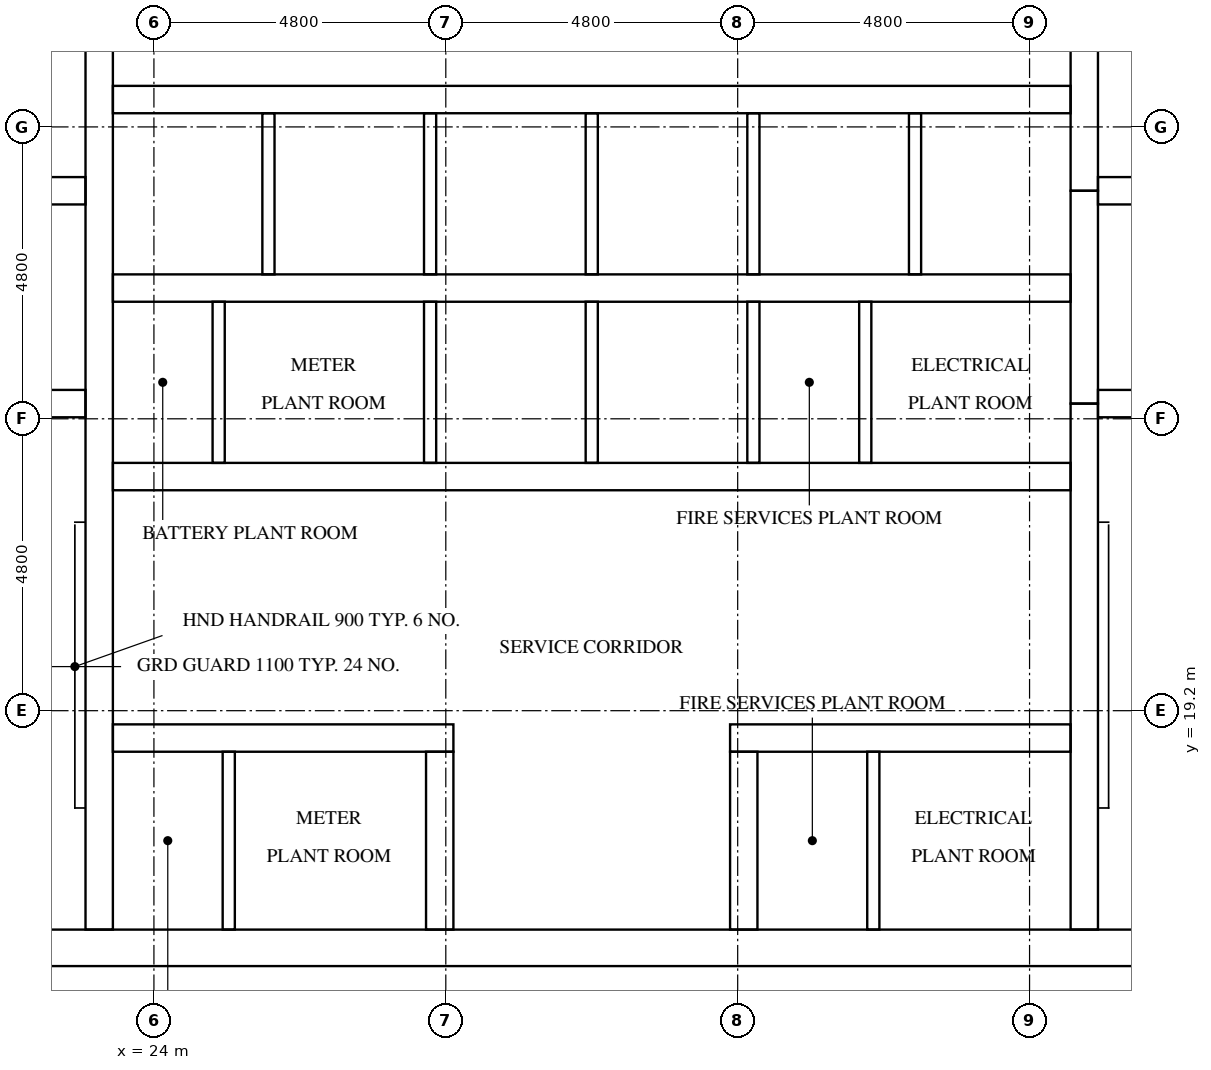
"""IFC4 building model, lengths in metres.
Left out: names, types, materials, properties, quantities, classifications, styles, units other than length and angle.
Written with IfcOpenShell. Run it as: python <this file> out.ifc"""

import sys

from ifc_helpers import new_model, si_unit, direction, frame, frame_2d, origin, place, context, subcontext, project, spatial, rectangle, extrude, element, fill, save


model = new_model("IFC4")
c1 = context("Model", 3, precision=1e-05, world=origin(), true_north=direction((0.0, 1.0)))
c2 = subcontext(c1, "Body", "Model", "MODEL_VIEW")
j1 = project(units=[si_unit("LENGTHUNIT", "METRE"), si_unit("PLANEANGLEUNIT", "RADIAN")], contexts=[c1])
p1 = place(None, origin())
s1 = spatial("IfcSite", under=j1, at=p1, CompositionType="ELEMENT")
p2 = place(p1, origin())
s2 = spatial("IfcBuilding", under=s1, at=p2, CompositionType="ELEMENT")
p3 = place(p2, frame((0.0, 0.0, 233.3)))
s3 = spatial("IfcBuildingStorey", under=s2, at=p3, CompositionType="ELEMENT", Elevation=233.3)
p4 = place(p3, frame((15.0, 15.3, 0.0), z_axis=(0.0, 0.0, 1.0), x_axis=(1.0, 0.0, 0.0)))
e1 = element("IfcWall", 1, at=p4, inside=s3, PredefinedType="SHEAR", context=c2, shape_type="SweptSolid", body=[
    extrude(rectangle(XDim=32.4, YDim=0.6, at=frame_2d((16.2, 0.0))), origin(), (0.0, 0.0, 1.0), 5.1),
])
p5 = place(p4, frame((15.3, 0.0, 0.0)))
e2 = element("IfcOpeningElement", 2, at=p5, cuts=e1, PredefinedType="OPENING", context=c2, shape_type="SweptSolid", body=[
    extrude(rectangle(XDim=1.8, YDim=2.1, at=frame_2d((0.9, 1.05))), frame((0.0, 0.31, 0.0), z_axis=(0.0, -1.0, 0.0), x_axis=(1.0, 0.0, 0.0)), (0.0, 0.0, 1.0), 0.62),
])
p6 = place(p3, frame((23.1, 15.6, 0.0), z_axis=(0.0, 0.0, 1.0), x_axis=(0.0, 1.0, 0.0)))
e3 = element("IfcWall", 3, at=p6, inside=s3, PredefinedType="SHEAR", context=c2, shape_type="SweptSolid", body=[
    extrude(rectangle(XDim=21.6, YDim=0.45, at=frame_2d((10.8, 0.0))), origin(), (0.0, 0.0, 1.0), 5.1),
])
p7 = place(p3, frame((39.3, 15.6, 0.0), z_axis=(0.0, 0.0, 1.0), x_axis=(0.0, 1.0, 0.0)))
e4 = element("IfcWall", 4, at=p7, inside=s3, PredefinedType="SHEAR", context=c2, shape_type="SweptSolid", body=[
    extrude(rectangle(XDim=8.65, YDim=0.45, at=frame_2d((4.325, 0.0))), origin(), (0.0, 0.0, 1.0), 5.1),
])
p8 = place(p3, frame((39.3, 24.25, 0.0), z_axis=(0.0, 0.0, 1.0), x_axis=(0.0, 1.0, 0.0)))
e5 = element("IfcWall", 5, at=p8, inside=s3, PredefinedType="SHEAR", context=c2, shape_type="SweptSolid", body=[
    extrude(rectangle(XDim=3.5, YDim=0.45, at=frame_2d((1.75, 0.0))), origin(), (0.0, 0.0, 1.0), 5.1),
])
p9 = place(p3, frame((39.3, 27.75, 0.0), z_axis=(0.0, 0.0, 1.0), x_axis=(0.0, 1.0, 0.0)))
e6 = element("IfcWall", 6, at=p9, inside=s3, PredefinedType="SHEAR", context=c2, shape_type="SweptSolid", body=[
    extrude(rectangle(XDim=9.45, YDim=0.45, at=frame_2d((4.725, 0.0))), origin(), (0.0, 0.0, 1.0), 5.1),
])
for number, where, z_axis, x_axis in (
    (7, (19.275, 24.25, 0.0), (0.0, 0.0, 1.0), (1.0, 0.0, 0.0)),
    (8, (19.275, 27.75, 0.0), (0.0, 0.0, 1.0), (1.0, 0.0, 0.0)),
    (9, (39.525, 24.25, 0.0), (0.0, 0.0, 1.0), (1.0, 0.0, 0.0)),
    (10, (39.525, 27.75, 0.0), (0.0, 0.0, 1.0), (1.0, 0.0, 0.0)),
):
    element("IfcWall", number, at=place(p3, frame(where, z_axis=z_axis, x_axis=x_axis)), inside=s3, PredefinedType="SHEAR", context=c2, shape_type="SweptSolid", body=[
        extrude(rectangle(XDim=3.6, YDim=0.45, at=frame_2d((1.8, 0.0))), origin(), (0.0, 0.0, 1.0), 5.1),
    ])
p10 = place(p3, frame((23.325, 18.75, 0.0), z_axis=(0.0, 0.0, 1.0), x_axis=(1.0, 0.0, 0.0)))
e11 = element("IfcWall", 11, at=p10, inside=s3, PredefinedType="SHEAR", context=c2, shape_type="SweptSolid", body=[
    extrude(rectangle(XDim=5.6, YDim=0.45, at=frame_2d((2.8, 0.0))), origin(), (0.0, 0.0, 1.0), 5.1),
])
p11 = place(p10, frame((0.403, 0.0, 0.0)))
e12 = element("IfcOpeningElement", 12, at=p11, cuts=e11, PredefinedType="OPENING", context=c2, shape_type="SweptSolid", body=[
    extrude(rectangle(XDim=1.0, YDim=2.1, at=frame_2d((0.5, 1.05))), frame((0.0, 0.235, 0.0), z_axis=(0.0, -1.0, 0.0), x_axis=(1.0, 0.0, 0.0)), (0.0, 0.0, 1.0), 0.47),
])
p12 = place(p10, frame((3.078, 0.0, 0.0)))
e13 = element("IfcOpeningElement", 13, at=p12, cuts=e11, PredefinedType="OPENING", context=c2, shape_type="SweptSolid", body=[
    extrude(rectangle(XDim=1.0, YDim=2.1, at=frame_2d((0.5, 1.05))), frame((0.0, 0.235, 0.0), z_axis=(0.0, -1.0, 0.0), x_axis=(1.0, 0.0, 0.0)), (0.0, 0.0, 1.0), 0.47),
])
p13 = place(p3, frame((33.475, 18.75, 0.0), z_axis=(0.0, 0.0, 1.0), x_axis=(1.0, 0.0, 0.0)))
e14 = element("IfcWall", 14, at=p13, inside=s3, PredefinedType="SHEAR", context=c2, shape_type="SweptSolid", body=[
    extrude(rectangle(XDim=5.6, YDim=0.45, at=frame_2d((2.8, 0.0))), origin(), (0.0, 0.0, 1.0), 5.1),
])
p14 = place(p13, frame((0.853, 0.0, 0.0)))
e15 = element("IfcOpeningElement", 15, at=p14, cuts=e14, PredefinedType="OPENING", context=c2, shape_type="SweptSolid", body=[
    extrude(rectangle(XDim=1.0, YDim=2.1, at=frame_2d((0.5, 1.05))), frame((0.0, 0.235, 0.0), z_axis=(0.0, -1.0, 0.0), x_axis=(1.0, 0.0, 0.0)), (0.0, 0.0, 1.0), 0.47),
])
p15 = place(p13, frame((3.528, 0.0, 0.0)))
e16 = element("IfcOpeningElement", 16, at=p15, cuts=e14, PredefinedType="OPENING", context=c2, shape_type="SweptSolid", body=[
    extrude(rectangle(XDim=1.0, YDim=2.1, at=frame_2d((0.5, 1.05))), frame((0.0, 0.235, 0.0), z_axis=(0.0, -1.0, 0.0), x_axis=(1.0, 0.0, 0.0)), (0.0, 0.0, 1.0), 0.47),
])
p16 = place(p3, frame((23.325, 23.05, 0.0), z_axis=(0.0, 0.0, 1.0), x_axis=(1.0, 0.0, 0.0)))
e17 = element("IfcWall", 17, at=p16, inside=s3, PredefinedType="SHEAR", context=c2, shape_type="SweptSolid", body=[
    extrude(rectangle(XDim=15.75, YDim=0.45, at=frame_2d((7.875, 0.0))), origin(), (0.0, 0.0, 1.0), 5.1),
])
p17 = place(p16, frame((0.32, 0.0, 0.0)))
e18 = element("IfcOpeningElement", 18, at=p17, cuts=e17, PredefinedType="OPENING", context=c2, shape_type="SweptSolid", body=[
    extrude(rectangle(XDim=1.0, YDim=2.1, at=frame_2d((0.5, 1.05))), frame((0.0, 0.235, 0.0), z_axis=(0.0, -1.0, 0.0), x_axis=(1.0, 0.0, 0.0)), (0.0, 0.0, 1.0), 0.47),
])
p18 = place(p16, frame((2.978, 0.0, 0.0)))
e19 = element("IfcOpeningElement", 19, at=p18, cuts=e17, PredefinedType="OPENING", context=c2, shape_type="SweptSolid", body=[
    extrude(rectangle(XDim=1.0, YDim=2.1, at=frame_2d((0.5, 1.05))), frame((0.0, 0.235, 0.0), z_axis=(0.0, -1.0, 0.0), x_axis=(1.0, 0.0, 0.0)), (0.0, 0.0, 1.0), 0.47),
])
p19 = place(p16, frame((10.953, 0.0, 0.0)))
e20 = element("IfcOpeningElement", 20, at=p19, cuts=e17, PredefinedType="OPENING", context=c2, shape_type="SweptSolid", body=[
    extrude(rectangle(XDim=1.0, YDim=2.1, at=frame_2d((0.5, 1.05))), frame((0.0, 0.235, 0.0), z_axis=(0.0, -1.0, 0.0), x_axis=(1.0, 0.0, 0.0)), (0.0, 0.0, 1.0), 0.47),
])
p20 = place(p16, frame((13.612, 0.0, 0.0)))
e21 = element("IfcOpeningElement", 21, at=p20, cuts=e17, PredefinedType="OPENING", context=c2, shape_type="SweptSolid", body=[
    extrude(rectangle(XDim=1.0, YDim=2.1, at=frame_2d((0.5, 1.05))), frame((0.0, 0.235, 0.0), z_axis=(0.0, -1.0, 0.0), x_axis=(1.0, 0.0, 0.0)), (0.0, 0.0, 1.0), 0.47),
])
p21 = place(p3, frame((23.325, 26.15, 0.0), z_axis=(0.0, 0.0, 1.0), x_axis=(1.0, 0.0, 0.0)))
e22 = element("IfcWall", 22, at=p21, inside=s3, PredefinedType="SHEAR", context=c2, shape_type="SweptSolid", body=[
    extrude(rectangle(XDim=15.75, YDim=0.45, at=frame_2d((7.875, 0.0))), origin(), (0.0, 0.0, 1.0), 5.1),
])
p22 = place(p3, frame((23.325, 29.25, 0.0), z_axis=(0.0, 0.0, 1.0), x_axis=(1.0, 0.0, 0.0)))
e23 = element("IfcWall", 23, at=p22, inside=s3, PredefinedType="SHEAR", context=c2, shape_type="SweptSolid", body=[
    extrude(rectangle(XDim=15.75, YDim=0.45, at=frame_2d((7.875, 0.0))), origin(), (0.0, 0.0, 1.0), 5.1),
])
p23 = place(p22, frame((0.679, 0.0, 0.0)))
e24 = element("IfcOpeningElement", 24, at=p23, cuts=e23, PredefinedType="OPENING", context=c2, shape_type="SweptSolid", body=[
    extrude(rectangle(XDim=1.1, YDim=2.1, at=frame_2d((0.55, 1.05))), frame((0.0, 0.235, 0.0), z_axis=(0.0, -1.0, 0.0), x_axis=(1.0, 0.0, 0.0)), (0.0, 0.0, 1.0), 0.47),
])
p24 = place(p22, frame((3.337, 0.0, 0.0)))
e25 = element("IfcOpeningElement", 25, at=p24, cuts=e23, PredefinedType="OPENING", context=c2, shape_type="SweptSolid", body=[
    extrude(rectangle(XDim=1.1, YDim=2.1, at=frame_2d((0.55, 1.05))), frame((0.0, 0.235, 0.0), z_axis=(0.0, -1.0, 0.0), x_axis=(1.0, 0.0, 0.0)), (0.0, 0.0, 1.0), 0.47),
])
p25 = place(p22, frame((5.996, 0.0, 0.0)))
e26 = element("IfcOpeningElement", 26, at=p25, cuts=e23, PredefinedType="OPENING", context=c2, shape_type="SweptSolid", body=[
    extrude(rectangle(XDim=1.1, YDim=2.1, at=frame_2d((0.55, 1.05))), frame((0.0, 0.235, 0.0), z_axis=(0.0, -1.0, 0.0), x_axis=(1.0, 0.0, 0.0)), (0.0, 0.0, 1.0), 0.47),
])
p26 = place(p22, frame((8.654, 0.0, 0.0)))
e27 = element("IfcOpeningElement", 27, at=p26, cuts=e23, PredefinedType="OPENING", context=c2, shape_type="SweptSolid", body=[
    extrude(rectangle(XDim=1.1, YDim=2.1, at=frame_2d((0.55, 1.05))), frame((0.0, 0.235, 0.0), z_axis=(0.0, -1.0, 0.0), x_axis=(1.0, 0.0, 0.0)), (0.0, 0.0, 1.0), 0.47),
])
p27 = place(p22, frame((11.312, 0.0, 0.0)))
e28 = element("IfcOpeningElement", 28, at=p27, cuts=e23, PredefinedType="OPENING", context=c2, shape_type="SweptSolid", body=[
    extrude(rectangle(XDim=1.1, YDim=2.1, at=frame_2d((0.55, 1.05))), frame((0.0, 0.235, 0.0), z_axis=(0.0, -1.0, 0.0), x_axis=(1.0, 0.0, 0.0)), (0.0, 0.0, 1.0), 0.47),
])
p28 = place(p22, frame((13.971, 0.0, 0.0)))
e29 = element("IfcOpeningElement", 29, at=p28, cuts=e23, PredefinedType="OPENING", context=c2, shape_type="SweptSolid", body=[
    extrude(rectangle(XDim=1.1, YDim=2.1, at=frame_2d((0.55, 1.05))), frame((0.0, 0.235, 0.0), z_axis=(0.0, -1.0, 0.0), x_axis=(1.0, 0.0, 0.0)), (0.0, 0.0, 1.0), 0.47),
])
for number, where, z_axis, x_axis in (
    (30, (28.7, 15.6, 0.0), (0.0, 0.0, 1.0), (0.0, 1.0, 0.0)),
    (31, (33.7, 15.6, 0.0), (0.0, 0.0, 1.0), (0.0, 1.0, 0.0)),
):
    element("IfcWall", number, at=place(p3, frame(where, z_axis=z_axis, x_axis=x_axis)), inside=s3, PredefinedType="SHEAR", context=c2, shape_type="SweptSolid", body=[
        extrude(rectangle(XDim=2.925, YDim=0.45, at=frame_2d((1.462, 0.0))), origin(), (0.0, 0.0, 1.0), 5.1),
    ])
p29 = place(p3, frame((25.883, 26.375, 0.0), z_axis=(0.0, 0.0, 1.0), x_axis=(0.0, 1.0, 0.0)))
e32 = element("IfcWall", 32, at=p29, inside=s3, PredefinedType="SOLIDWALL", context=c2, shape_type="SweptSolid", body=[
    extrude(rectangle(XDim=2.65, YDim=0.2, at=frame_2d((1.325, 0.0))), origin(), (0.0, 0.0, 1.0), 5.1),
])
p30 = place(p3, frame((28.542, 23.275, 0.0), z_axis=(0.0, 0.0, 1.0), x_axis=(0.0, 1.0, 0.0)))
e33 = element("IfcWall", 33, at=p30, inside=s3, PredefinedType="SOLIDWALL", context=c2, shape_type="SweptSolid", body=[
    extrude(rectangle(XDim=2.65, YDim=0.2, at=frame_2d((1.325, 0.0))), origin(), (0.0, 0.0, 1.0), 5.1),
])
p31 = place(p3, frame((28.542, 26.375, 0.0), z_axis=(0.0, 0.0, 1.0), x_axis=(0.0, 1.0, 0.0)))
e34 = element("IfcWall", 34, at=p31, inside=s3, PredefinedType="SOLIDWALL", context=c2, shape_type="SweptSolid", body=[
    extrude(rectangle(XDim=2.65, YDim=0.2, at=frame_2d((1.325, 0.0))), origin(), (0.0, 0.0, 1.0), 5.1),
])
p32 = place(p3, frame((31.2, 23.275, 0.0), z_axis=(0.0, 0.0, 1.0), x_axis=(0.0, 1.0, 0.0)))
e35 = element("IfcWall", 35, at=p32, inside=s3, PredefinedType="SOLIDWALL", context=c2, shape_type="SweptSolid", body=[
    extrude(rectangle(XDim=2.65, YDim=0.2, at=frame_2d((1.325, 0.0))), origin(), (0.0, 0.0, 1.0), 5.1),
])
p33 = place(p3, frame((31.2, 26.375, 0.0), z_axis=(0.0, 0.0, 1.0), x_axis=(0.0, 1.0, 0.0)))
e36 = element("IfcWall", 36, at=p33, inside=s3, PredefinedType="SOLIDWALL", context=c2, shape_type="SweptSolid", body=[
    extrude(rectangle(XDim=2.65, YDim=0.2, at=frame_2d((1.325, 0.0))), origin(), (0.0, 0.0, 1.0), 5.1),
])
p34 = place(p3, frame((33.858, 23.275, 0.0), z_axis=(0.0, 0.0, 1.0), x_axis=(0.0, 1.0, 0.0)))
e37 = element("IfcWall", 37, at=p34, inside=s3, PredefinedType="SOLIDWALL", context=c2, shape_type="SweptSolid", body=[
    extrude(rectangle(XDim=2.65, YDim=0.2, at=frame_2d((1.325, 0.0))), origin(), (0.0, 0.0, 1.0), 5.1),
])
for number, where, z_axis, x_axis in (
    (38, (33.858, 26.375, 0.0), (0.0, 0.0, 1.0), (0.0, 1.0, 0.0)),
    (39, (36.517, 26.375, 0.0), (0.0, 0.0, 1.0), (0.0, 1.0, 0.0)),
):
    element("IfcWall", number, at=place(p3, frame(where, z_axis=z_axis, x_axis=x_axis)), inside=s3, PredefinedType="SOLIDWALL", context=c2, shape_type="SweptSolid", body=[
        extrude(rectangle(XDim=2.65, YDim=0.2, at=frame_2d((1.325, 0.0))), origin(), (0.0, 0.0, 1.0), 5.1),
    ])
for number, where, z_axis, x_axis in (
    (40, (25.065, 23.275, 0.0), (0.0, 0.0, 1.0), (0.0, 1.0, 0.0)),
    (41, (35.698, 23.275, 0.0), (0.0, 0.0, 1.0), (0.0, 1.0, 0.0)),
):
    element("IfcWall", number, at=place(p3, frame(where, z_axis=z_axis, x_axis=x_axis)), inside=s3, PredefinedType="PARTITIONING", context=c2, shape_type="SweptSolid", body=[
        extrude(rectangle(XDim=2.65, YDim=0.2, at=frame_2d((1.325, 0.0))), origin(), (0.0, 0.0, 1.0), 5.1),
    ])
for number, where, z_axis, x_axis in (
    (42, (25.23, 15.6, 0.0), (0.0, 0.0, 1.0), (0.0, 1.0, 0.0)),
    (43, (35.831, 15.6, 0.0), (0.0, 0.0, 1.0), (0.0, 1.0, 0.0)),
):
    element("IfcWall", number, at=place(p3, frame(where, z_axis=z_axis, x_axis=x_axis)), inside=s3, PredefinedType="PARTITIONING", context=c2, shape_type="SweptSolid", body=[
        extrude(rectangle(XDim=2.925, YDim=0.2, at=frame_2d((1.462, 0.0))), origin(), (0.0, 0.0, 1.0), 5.1),
    ])
p35 = place(p23, origin())
e44 = element("IfcDoor", 44, at=p35, inside=s3, OperationType="DOUBLE_DOOR_SLIDING", PredefinedType="DOOR", context=c2, shape_type="SweptSolid", body=[
    extrude(rectangle(XDim=1.1, YDim=2.1, at=frame_2d((0.55, 1.05))), frame((0.0, 0.025, 0.0), z_axis=(0.0, -1.0, 0.0), x_axis=(1.0, 0.0, 0.0)), (0.0, 0.0, 1.0), 0.05),
])
fill(e24, e44)
p36 = place(p24, origin())
e45 = element("IfcDoor", 45, at=p36, inside=s3, OperationType="DOUBLE_DOOR_SLIDING", PredefinedType="DOOR", context=c2, shape_type="SweptSolid", body=[
    extrude(rectangle(XDim=1.1, YDim=2.1, at=frame_2d((0.55, 1.05))), frame((0.0, 0.025, 0.0), z_axis=(0.0, -1.0, 0.0), x_axis=(1.0, 0.0, 0.0)), (0.0, 0.0, 1.0), 0.05),
])
fill(e25, e45)
p37 = place(p25, origin())
e46 = element("IfcDoor", 46, at=p37, inside=s3, OperationType="DOUBLE_DOOR_SLIDING", PredefinedType="DOOR", context=c2, shape_type="SweptSolid", body=[
    extrude(rectangle(XDim=1.1, YDim=2.1, at=frame_2d((0.55, 1.05))), frame((0.0, 0.025, 0.0), z_axis=(0.0, -1.0, 0.0), x_axis=(1.0, 0.0, 0.0)), (0.0, 0.0, 1.0), 0.05),
])
fill(e26, e46)
p38 = place(p26, origin())
e47 = element("IfcDoor", 47, at=p38, inside=s3, OperationType="DOUBLE_DOOR_SLIDING", PredefinedType="DOOR", context=c2, shape_type="SweptSolid", body=[
    extrude(rectangle(XDim=1.1, YDim=2.1, at=frame_2d((0.55, 1.05))), frame((0.0, 0.025, 0.0), z_axis=(0.0, -1.0, 0.0), x_axis=(1.0, 0.0, 0.0)), (0.0, 0.0, 1.0), 0.05),
])
fill(e27, e47)
p39 = place(p27, origin())
e48 = element("IfcDoor", 48, at=p39, inside=s3, OperationType="DOUBLE_DOOR_SLIDING", PredefinedType="DOOR", context=c2, shape_type="SweptSolid", body=[
    extrude(rectangle(XDim=1.1, YDim=2.1, at=frame_2d((0.55, 1.05))), frame((0.0, 0.025, 0.0), z_axis=(0.0, -1.0, 0.0), x_axis=(1.0, 0.0, 0.0)), (0.0, 0.0, 1.0), 0.05),
])
fill(e28, e48)
p40 = place(p28, origin())
e49 = element("IfcDoor", 49, at=p40, inside=s3, OperationType="DOUBLE_DOOR_SLIDING", PredefinedType="DOOR", context=c2, shape_type="SweptSolid", body=[
    extrude(rectangle(XDim=1.1, YDim=2.1, at=frame_2d((0.55, 1.05))), frame((0.0, 0.025, 0.0), z_axis=(0.0, -1.0, 0.0), x_axis=(1.0, 0.0, 0.0)), (0.0, 0.0, 1.0), 0.05),
])
fill(e29, e49)
p41 = place(p5, frame((1.8, 0.0, 0.0), z_axis=(0.0, 0.0, 1.0), x_axis=(-1.0, 0.0, 0.0)))
e50 = element("IfcDoor", 50, at=p41, inside=s3, OperationType="DOUBLE_DOOR_SINGLE_SWING", PredefinedType="DOOR", context=c2, shape_type="SweptSolid", body=[
    extrude(rectangle(XDim=1.8, YDim=2.1, at=frame_2d((0.9, 1.05))), frame((0.0, 0.025, 0.0), z_axis=(0.0, -1.0, 0.0), x_axis=(1.0, 0.0, 0.0)), (0.0, 0.0, 1.0), 0.05),
])
fill(e2, e50)
p42 = place(p17, frame((1.0, 0.0, 0.0), z_axis=(0.0, 0.0, 1.0), x_axis=(-1.0, 0.0, 0.0)))
e51 = element("IfcDoor", 51, at=p42, inside=s3, OperationType="SINGLE_SWING_RIGHT", PredefinedType="DOOR", context=c2, shape_type="SweptSolid", body=[
    extrude(rectangle(XDim=1.0, YDim=2.1, at=frame_2d((0.5, 1.05))), frame((0.0, 0.025, 0.0), z_axis=(0.0, -1.0, 0.0), x_axis=(1.0, 0.0, 0.0)), (0.0, 0.0, 1.0), 0.05),
])
fill(e18, e51)
p43 = place(p18, frame((1.0, 0.0, 0.0), z_axis=(0.0, 0.0, 1.0), x_axis=(-1.0, 0.0, 0.0)))
e52 = element("IfcDoor", 52, at=p43, inside=s3, OperationType="SINGLE_SWING_LEFT", PredefinedType="DOOR", context=c2, shape_type="SweptSolid", body=[
    extrude(rectangle(XDim=1.0, YDim=2.1, at=frame_2d((0.5, 1.05))), frame((0.0, 0.025, 0.0), z_axis=(0.0, -1.0, 0.0), x_axis=(1.0, 0.0, 0.0)), (0.0, 0.0, 1.0), 0.05),
])
fill(e19, e52)
p44 = place(p19, frame((1.0, 0.0, 0.0), z_axis=(0.0, 0.0, 1.0), x_axis=(-1.0, 0.0, 0.0)))
e53 = element("IfcDoor", 53, at=p44, inside=s3, OperationType="SINGLE_SWING_RIGHT", PredefinedType="DOOR", context=c2, shape_type="SweptSolid", body=[
    extrude(rectangle(XDim=1.0, YDim=2.1, at=frame_2d((0.5, 1.05))), frame((0.0, 0.025, 0.0), z_axis=(0.0, -1.0, 0.0), x_axis=(1.0, 0.0, 0.0)), (0.0, 0.0, 1.0), 0.05),
])
fill(e20, e53)
p45 = place(p20, frame((1.0, 0.0, 0.0), z_axis=(0.0, 0.0, 1.0), x_axis=(-1.0, 0.0, 0.0)))
e54 = element("IfcDoor", 54, at=p45, inside=s3, OperationType="SINGLE_SWING_LEFT", PredefinedType="DOOR", context=c2, shape_type="SweptSolid", body=[
    extrude(rectangle(XDim=1.0, YDim=2.1, at=frame_2d((0.5, 1.05))), frame((0.0, 0.025, 0.0), z_axis=(0.0, -1.0, 0.0), x_axis=(1.0, 0.0, 0.0)), (0.0, 0.0, 1.0), 0.05),
])
fill(e21, e54)
p46 = place(p11, origin())
e55 = element("IfcDoor", 55, at=p46, inside=s3, OperationType="SINGLE_SWING_RIGHT", PredefinedType="DOOR", context=c2, shape_type="SweptSolid", body=[
    extrude(rectangle(XDim=1.0, YDim=2.1, at=frame_2d((0.5, 1.05))), frame((0.0, 0.025, 0.0), z_axis=(0.0, -1.0, 0.0), x_axis=(1.0, 0.0, 0.0)), (0.0, 0.0, 1.0), 0.05),
])
fill(e12, e55)
p47 = place(p12, origin())
e56 = element("IfcDoor", 56, at=p47, inside=s3, OperationType="SINGLE_SWING_LEFT", PredefinedType="DOOR", context=c2, shape_type="SweptSolid", body=[
    extrude(rectangle(XDim=1.0, YDim=2.1, at=frame_2d((0.5, 1.05))), frame((0.0, 0.025, 0.0), z_axis=(0.0, -1.0, 0.0), x_axis=(1.0, 0.0, 0.0)), (0.0, 0.0, 1.0), 0.05),
])
fill(e13, e56)
p48 = place(p14, origin())
e57 = element("IfcDoor", 57, at=p48, inside=s3, OperationType="SINGLE_SWING_RIGHT", PredefinedType="DOOR", context=c2, shape_type="SweptSolid", body=[
    extrude(rectangle(XDim=1.0, YDim=2.1, at=frame_2d((0.5, 1.05))), frame((0.0, 0.025, 0.0), z_axis=(0.0, -1.0, 0.0), x_axis=(1.0, 0.0, 0.0)), (0.0, 0.0, 1.0), 0.05),
])
fill(e15, e57)
p49 = place(p15, origin())
e58 = element("IfcDoor", 58, at=p49, inside=s3, OperationType="SINGLE_SWING_LEFT", PredefinedType="DOOR", context=c2, shape_type="SweptSolid", body=[
    extrude(rectangle(XDim=1.0, YDim=2.1, at=frame_2d((0.5, 1.05))), frame((0.0, 0.025, 0.0), z_axis=(0.0, -1.0, 0.0), x_axis=(1.0, 0.0, 0.0)), (0.0, 0.0, 1.0), 0.05),
])
fill(e16, e58)
save(model, sys.argv[1])
